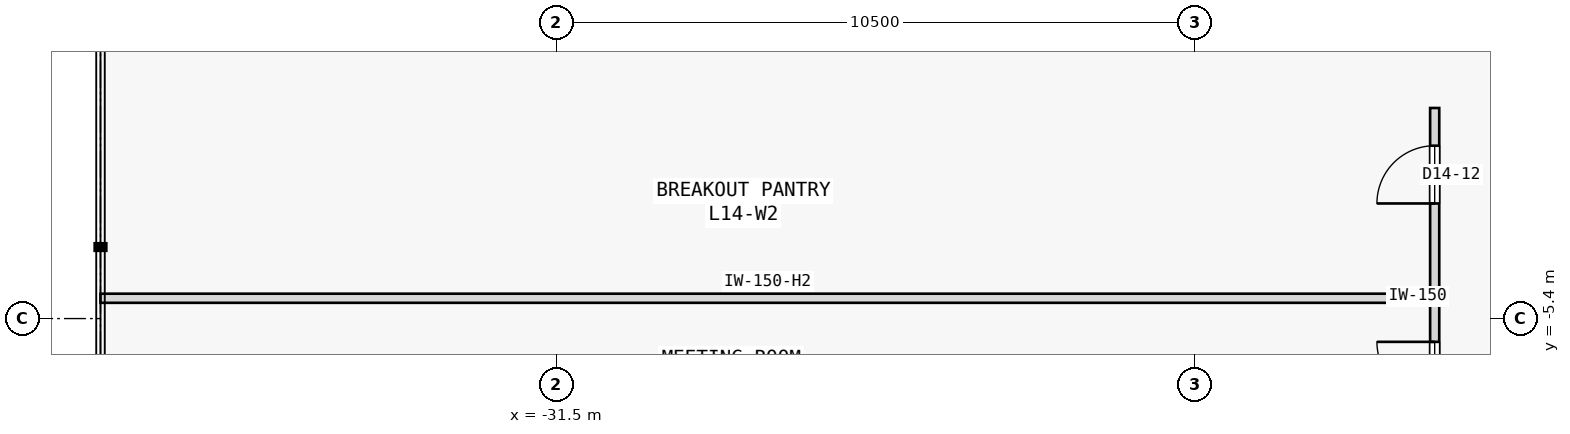
"""IFC4 building model, lengths in metres.
Left out: names, types, materials, properties, quantities, classifications, styles, units other than length and angle.
Written with IfcOpenShell. Run it as: python <this file> out.ifc"""

import sys

from ifc_helpers import new_model, si_unit, direction, frame, frame_2d, origin, place, context, subcontext, project, spatial, rectangle, extrude, element, fill, save


model = new_model("IFC4")
c1 = context("Model", 3, precision=1e-05, world=origin(), true_north=direction((0.0, 1.0)))
c2 = subcontext(c1, "Body", "Model", "MODEL_VIEW")
j1 = project(units=[si_unit("LENGTHUNIT", "METRE"), si_unit("PLANEANGLEUNIT", "RADIAN")], contexts=[c1])
p1 = place(None, origin())
s1 = spatial("IfcSite", under=j1, at=p1, CompositionType="ELEMENT")
p2 = place(p1, origin())
s2 = spatial("IfcBuilding", under=s1, at=p2, CompositionType="ELEMENT")
p3 = place(p2, frame((0.0, 0.0, 59.8)))
s3 = spatial("IfcBuildingStorey", under=s2, at=p3, CompositionType="ELEMENT", Elevation=59.8)
p4 = place(p3, frame((-17.059, -7.45, 0.0), z_axis=(0.0, 0.0, 1.0), x_axis=(0.0, 1.0, 0.0)))
e1 = element("IfcWall", 1, at=p4, inside=s3, PredefinedType="PARTITIONING", context=c2, shape_type="SweptSolid", body=[
    extrude(rectangle(XDim=2.384, YDim=0.15, at=frame_2d((1.192, 0.0))), origin(), (0.0, 0.0, 1.0), 3.575),
])
p5 = place(p4, frame((0.717, 0.0, 0.0)))
e2 = element("IfcOpeningElement", 2, at=p5, cuts=e1, PredefinedType="OPENING", context=c2, shape_type="SweptSolid", body=[
    extrude(rectangle(XDim=0.95, YDim=2.15, at=frame_2d((0.475, 1.075))), frame((0.0, 0.085, 0.0), z_axis=(0.0, -1.0, 0.0), x_axis=(1.0, 0.0, 0.0)), (0.0, 0.0, 1.0), 0.17),
])
p6 = place(p3, frame((-17.059, -5.066, 0.0), z_axis=(0.0, 0.0, 1.0), x_axis=(0.0, 1.0, 0.0)))
e3 = element("IfcWall", 3, at=p6, inside=s3, PredefinedType="PARTITIONING", context=c2, shape_type="SweptSolid", body=[
    extrude(rectangle(XDim=3.129, YDim=0.15, at=frame_2d((1.564, 0.0))), origin(), (0.0, 0.0, 1.0), 3.575),
])
p7 = place(p6, frame((1.559, 0.0, 0.0)))
e4 = element("IfcOpeningElement", 4, at=p7, cuts=e3, PredefinedType="OPENING", context=c2, shape_type="SweptSolid", body=[
    extrude(rectangle(XDim=0.95, YDim=2.15, at=frame_2d((0.475, 1.075))), frame((0.0, 0.085, 0.0), z_axis=(0.0, -1.0, 0.0), x_axis=(1.0, 0.0, 0.0)), (0.0, 0.0, 1.0), 0.17),
])
p8 = place(p3, frame((-39.0, -5.066, 0.0), z_axis=(0.0, 0.0, 1.0), x_axis=(1.0, 0.0, 0.0)))
e5 = element("IfcWall", 5, at=p8, inside=s3, PredefinedType="PARTITIONING", context=c2, shape_type="SweptSolid", body=[
    extrude(rectangle(XDim=21.941, YDim=0.15, at=frame_2d((10.97, 0.0))), origin(), (0.0, 0.0, 1.0), 2.975),
])
p9 = place(p5, origin())
e6 = element("IfcDoor", 6, at=p9, inside=s3, OperationType="SINGLE_SWING_RIGHT", PredefinedType="DOOR", context=c2, shape_type="SweptSolid", body=[
    extrude(rectangle(XDim=0.95, YDim=2.15, at=frame_2d((0.475, 1.075))), frame((0.0, 0.025, 0.0), z_axis=(0.0, -1.0, 0.0), x_axis=(1.0, 0.0, 0.0)), (0.0, 0.0, 1.0), 0.05),
])
fill(e2, e6)
p10 = place(p7, origin())
e7 = element("IfcDoor", 7, at=p10, inside=s3, OperationType="SINGLE_SWING_LEFT", PredefinedType="DOOR", context=c2, shape_type="SweptSolid", body=[
    extrude(rectangle(XDim=0.95, YDim=2.15, at=frame_2d((0.475, 1.075))), frame((0.0, 0.025, 0.0), z_axis=(0.0, -1.0, 0.0), x_axis=(1.0, 0.0, 0.0)), (0.0, 0.0, 1.0), 0.05),
])
fill(e4, e7)
save(model, sys.argv[1])
